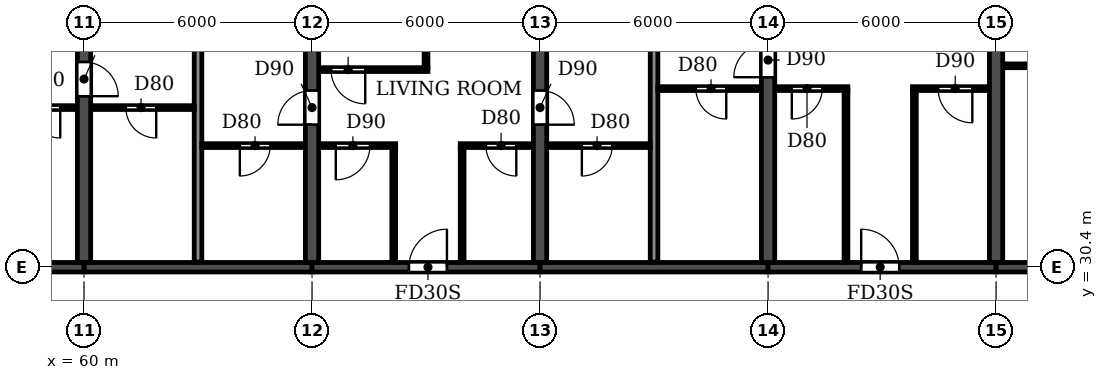
"""IFC4 building model, lengths in metres.
Left out: names, types, materials, properties, quantities, classifications, styles, units other than length and angle.
Written with IfcOpenShell. Run it as: python <this file> out.ifc"""

import sys

from ifc_helpers import new_model, si_unit, direction, frame, frame_2d, origin, place, context, subcontext, project, spatial, rectangle, extrude, element, fill, save


model = new_model("IFC4")
c1 = context("Model", 3, precision=1e-05, world=origin(), true_north=direction((0.0, 1.0)))
c2 = subcontext(c1, "Body", "Model", "MODEL_VIEW")
j1 = project(units=[si_unit("LENGTHUNIT", "METRE"), si_unit("PLANEANGLEUNIT", "RADIAN")], contexts=[c1])
p1 = place(None, origin())
s1 = spatial("IfcSite", under=j1, at=p1, CompositionType="ELEMENT")
p2 = place(p1, origin())
s2 = spatial("IfcBuilding", under=s1, at=p2, CompositionType="ELEMENT")
p3 = place(p2, frame((0.0, 0.0, 72.9)))
s3 = spatial("IfcBuildingStorey", under=s2, at=p3, CompositionType="ELEMENT", Elevation=72.9)
p4 = place(p3, frame((60.0, 30.525, 0.0), z_axis=(0.0, 0.0, 1.0), x_axis=(0.0, 1.0, 0.0)))
e1 = element("IfcWall", 1, at=p4, inside=s3, PredefinedType="SHEAR", context=c2, shape_type="SweptSolid", body=[
    extrude(rectangle(XDim=12.875, YDim=0.35, at=frame_2d((6.438, 0.0))), origin(), (0.0, 0.0, 1.0), 3.06),
])
p5 = place(p4, frame((4.375, 0.0, 0.0)))
e2 = element("IfcOpeningElement", 2, at=p5, cuts=e1, PredefinedType="OPENING", context=c2, shape_type="SweptSolid", body=[
    extrude(rectangle(XDim=0.9, YDim=2.1, at=frame_2d((0.45, 1.05))), frame((0.0, 0.185, 0.0), z_axis=(0.0, -1.0, 0.0), x_axis=(1.0, 0.0, 0.0)), (0.0, 0.0, 1.0), 0.37),
])
p6 = place(p3, frame((66.0, 30.525, 0.0), z_axis=(0.0, 0.0, 1.0), x_axis=(0.0, 1.0, 0.0)))
e3 = element("IfcWall", 3, at=p6, inside=s3, PredefinedType="SHEAR", context=c2, shape_type="SweptSolid", body=[
    extrude(rectangle(XDim=12.875, YDim=0.35, at=frame_2d((6.438, 0.0))), origin(), (0.0, 0.0, 1.0), 3.06),
])
p7 = place(p6, frame((3.625, 0.0, 0.0)))
e4 = element("IfcOpeningElement", 4, at=p7, cuts=e3, PredefinedType="OPENING", context=c2, shape_type="SweptSolid", body=[
    extrude(rectangle(XDim=0.9, YDim=2.1, at=frame_2d((0.45, 1.05))), frame((0.0, 0.185, 0.0), z_axis=(0.0, -1.0, 0.0), x_axis=(1.0, 0.0, 0.0)), (0.0, 0.0, 1.0), 0.37),
])
p8 = place(p3, frame((72.0, 30.525, 0.0), z_axis=(0.0, 0.0, 1.0), x_axis=(0.0, 1.0, 0.0)))
e5 = element("IfcWall", 5, at=p8, inside=s3, PredefinedType="SHEAR", context=c2, shape_type="SweptSolid", body=[
    extrude(rectangle(XDim=12.875, YDim=0.35, at=frame_2d((6.438, 0.0))), origin(), (0.0, 0.0, 1.0), 3.06),
])
p9 = place(p8, frame((3.625, 0.0, 0.0)))
e6 = element("IfcOpeningElement", 6, at=p9, cuts=e5, PredefinedType="OPENING", context=c2, shape_type="SweptSolid", body=[
    extrude(rectangle(XDim=0.9, YDim=2.1, at=frame_2d((0.45, 1.05))), frame((0.0, 0.185, 0.0), z_axis=(0.0, -1.0, 0.0), x_axis=(1.0, 0.0, 0.0)), (0.0, 0.0, 1.0), 0.37),
])
p10 = place(p3, frame((78.0, 30.525, 0.0), z_axis=(0.0, 0.0, 1.0), x_axis=(0.0, 1.0, 0.0)))
e7 = element("IfcWall", 7, at=p10, inside=s3, PredefinedType="SHEAR", context=c2, shape_type="SweptSolid", body=[
    extrude(rectangle(XDim=12.875, YDim=0.35, at=frame_2d((6.438, 0.0))), origin(), (0.0, 0.0, 1.0), 3.06),
])
p11 = place(p10, frame((4.875, 0.0, 0.0)))
e8 = element("IfcOpeningElement", 8, at=p11, cuts=e7, PredefinedType="OPENING", context=c2, shape_type="SweptSolid", body=[
    extrude(rectangle(XDim=0.9, YDim=2.1, at=frame_2d((0.45, 1.05))), frame((0.0, 0.185, 0.0), z_axis=(0.0, -1.0, 0.0), x_axis=(1.0, 0.0, 0.0)), (0.0, 0.0, 1.0), 0.37),
])
p12 = place(p3, frame((84.0, 30.525, 0.0), z_axis=(0.0, 0.0, 1.0), x_axis=(0.0, 1.0, 0.0)))
e9 = element("IfcWall", 9, at=p12, inside=s3, PredefinedType="SHEAR", context=c2, shape_type="SweptSolid", body=[
    extrude(rectangle(XDim=12.875, YDim=0.35, at=frame_2d((6.438, 0.0))), origin(), (0.0, 0.0, 1.0), 3.06),
])
p13 = place(p3, frame((54.0, 30.4, 0.0), z_axis=(0.0, 0.0, 1.0), x_axis=(1.0, 0.0, 0.0)))
e10 = element("IfcWall", 10, at=p13, inside=s3, PredefinedType="SHEAR", context=c2, shape_type="SweptSolid", body=[
    extrude(rectangle(XDim=6.0, YDim=0.25, at=frame_2d((3.0, 0.0))), origin(), (0.0, 0.0, 1.0), 2.46),
])
p14 = place(p13, frame((2.55, 0.0, 0.0)))
e11 = element("IfcOpeningElement", 11, at=p14, cuts=e10, PredefinedType="OPENING", context=c2, shape_type="SweptSolid", body=[
    extrude(rectangle(XDim=1.0, YDim=2.1, at=frame_2d((0.5, 1.05))), frame((0.0, 0.135, 0.0), z_axis=(0.0, -1.0, 0.0), x_axis=(1.0, 0.0, 0.0)), (0.0, 0.0, 1.0), 0.27),
])
p15 = place(p3, frame((60.0, 30.4, 0.0), z_axis=(0.0, 0.0, 1.0), x_axis=(1.0, 0.0, 0.0)))
e12 = element("IfcWall", 12, at=p15, inside=s3, PredefinedType="SHEAR", context=c2, shape_type="SweptSolid", body=[
    extrude(rectangle(XDim=6.0, YDim=0.25, at=frame_2d((3.0, 0.0))), origin(), (0.0, 0.0, 1.0), 2.46),
])
p16 = place(p3, frame((66.0, 30.4, 0.0), z_axis=(0.0, 0.0, 1.0), x_axis=(1.0, 0.0, 0.0)))
e13 = element("IfcWall", 13, at=p16, inside=s3, PredefinedType="SHEAR", context=c2, shape_type="SweptSolid", body=[
    extrude(rectangle(XDim=6.0, YDim=0.25, at=frame_2d((3.0, 0.0))), origin(), (0.0, 0.0, 1.0), 2.46),
])
p17 = place(p16, frame((2.55, 0.0, 0.0)))
e14 = element("IfcOpeningElement", 14, at=p17, cuts=e13, PredefinedType="OPENING", context=c2, shape_type="SweptSolid", body=[
    extrude(rectangle(XDim=1.0, YDim=2.1, at=frame_2d((0.5, 1.05))), frame((0.0, 0.135, 0.0), z_axis=(0.0, -1.0, 0.0), x_axis=(1.0, 0.0, 0.0)), (0.0, 0.0, 1.0), 0.27),
])
p18 = place(p3, frame((72.0, 30.4, 0.0), z_axis=(0.0, 0.0, 1.0), x_axis=(1.0, 0.0, 0.0)))
e15 = element("IfcWall", 15, at=p18, inside=s3, PredefinedType="SHEAR", context=c2, shape_type="SweptSolid", body=[
    extrude(rectangle(XDim=6.0, YDim=0.25, at=frame_2d((3.0, 0.0))), origin(), (0.0, 0.0, 1.0), 2.46),
])
p19 = place(p3, frame((78.0, 30.4, 0.0), z_axis=(0.0, 0.0, 1.0), x_axis=(1.0, 0.0, 0.0)))
e16 = element("IfcWall", 16, at=p19, inside=s3, PredefinedType="SHEAR", context=c2, shape_type="SweptSolid", body=[
    extrude(rectangle(XDim=6.0, YDim=0.25, at=frame_2d((3.0, 0.0))), origin(), (0.0, 0.0, 1.0), 2.46),
])
p20 = place(p19, frame((2.45, 0.0, 0.0)))
e17 = element("IfcOpeningElement", 17, at=p20, cuts=e16, PredefinedType="OPENING", context=c2, shape_type="SweptSolid", body=[
    extrude(rectangle(XDim=1.0, YDim=2.1, at=frame_2d((0.5, 1.05))), frame((0.0, 0.135, 0.0), z_axis=(0.0, -1.0, 0.0), x_axis=(1.0, 0.0, 0.0)), (0.0, 0.0, 1.0), 0.27),
])
p21 = place(p3, frame((84.0, 30.4, 0.0), z_axis=(0.0, 0.0, 1.0), x_axis=(1.0, 0.0, 0.0)))
e18 = element("IfcWall", 18, at=p21, inside=s3, PredefinedType="SHEAR", context=c2, shape_type="SweptSolid", body=[
    extrude(rectangle(XDim=6.0, YDim=0.25, at=frame_2d((3.0, 0.0))), origin(), (0.0, 0.0, 1.0), 2.46),
])
p22 = place(p21, frame((2.55, 0.0, 0.0)))
e19 = element("IfcOpeningElement", 19, at=p22, cuts=e18, PredefinedType="OPENING", context=c2, shape_type="SweptSolid", body=[
    extrude(rectangle(XDim=1.0, YDim=2.1, at=frame_2d((0.5, 1.05))), frame((0.0, 0.135, 0.0), z_axis=(0.0, -1.0, 0.0), x_axis=(1.0, 0.0, 0.0)), (0.0, 0.0, 1.0), 0.27),
])
for number, where, z_axis, x_axis in (
    (20, (63.0, 30.535, 0.0), (0.0, 0.0, 1.0), (0.0, 1.0, 0.0)),
    (21, (75.0, 30.535, 0.0), (0.0, 0.0, 1.0), (0.0, 1.0, 0.0)),
):
    element("IfcWall", number, at=place(p3, frame(where, z_axis=z_axis, x_axis=x_axis)), inside=s3, PredefinedType="PARTITIONING", context=c2, shape_type="SweptSolid", body=[
        extrude(rectangle(XDim=13.005, YDim=0.2, at=frame_2d((6.502, 0.0))), origin(), (0.0, 0.0, 1.0), 3.06),
    ])
p23 = place(p3, frame((63.1, 33.6, 0.0), z_axis=(0.0, 0.0, 1.0), x_axis=(1.0, 0.0, 0.0)))
e22 = element("IfcWall", 22, at=p23, inside=s3, PredefinedType="PARTITIONING", context=c2, shape_type="SweptSolid", body=[
    extrude(rectangle(XDim=2.715, YDim=0.1, at=frame_2d((1.357, 0.0))), origin(), (0.0, 0.0, 1.0), 3.06),
])
p24 = place(p23, frame((1.0, 0.0, 0.0)))
e23 = element("IfcOpeningElement", 23, at=p24, cuts=e22, PredefinedType="OPENING", context=c2, shape_type="SweptSolid", body=[
    extrude(rectangle(XDim=0.8, YDim=2.1, at=frame_2d((0.4, 1.05))), frame((0.0, 0.06, 0.0), z_axis=(0.0, -1.0, 0.0), x_axis=(1.0, 0.0, 0.0)), (0.0, 0.0, 1.0), 0.12),
])
p25 = place(p3, frame((66.185, 33.6, 0.0), z_axis=(0.0, 0.0, 1.0), x_axis=(1.0, 0.0, 0.0)))
e24 = element("IfcWall", 24, at=p25, inside=s3, PredefinedType="PARTITIONING", context=c2, shape_type="SweptSolid", body=[
    extrude(rectangle(XDim=2.015, YDim=0.1, at=frame_2d((1.007, 0.0))), origin(), (0.0, 0.0, 1.0), 3.06),
])
p26 = place(p25, frame((0.44, 0.0, 0.0)))
e25 = element("IfcOpeningElement", 25, at=p26, cuts=e24, PredefinedType="OPENING", context=c2, shape_type="SweptSolid", body=[
    extrude(rectangle(XDim=0.9, YDim=2.1, at=frame_2d((0.45, 1.05))), frame((0.0, 0.06, 0.0), z_axis=(0.0, -1.0, 0.0), x_axis=(1.0, 0.0, 0.0)), (0.0, 0.0, 1.0), 0.12),
])
p27 = place(p3, frame((69.9, 33.6, 0.0), z_axis=(0.0, 0.0, 1.0), x_axis=(1.0, 0.0, 0.0)))
e26 = element("IfcWall", 26, at=p27, inside=s3, PredefinedType="PARTITIONING", context=c2, shape_type="SweptSolid", body=[
    extrude(rectangle(XDim=1.915, YDim=0.1, at=frame_2d((0.958, 0.0))), origin(), (0.0, 0.0, 1.0), 3.06),
])
p28 = place(p27, frame((0.675, 0.0, 0.0)))
e27 = element("IfcOpeningElement", 27, at=p28, cuts=e26, PredefinedType="OPENING", context=c2, shape_type="SweptSolid", body=[
    extrude(rectangle(XDim=0.8, YDim=2.1, at=frame_2d((0.4, 1.05))), frame((0.0, 0.06, 0.0), z_axis=(0.0, -1.0, 0.0), x_axis=(1.0, 0.0, 0.0)), (0.0, 0.0, 1.0), 0.12),
])
p29 = place(p3, frame((72.185, 33.6, 0.0), z_axis=(0.0, 0.0, 1.0), x_axis=(1.0, 0.0, 0.0)))
e28 = element("IfcWall", 28, at=p29, inside=s3, PredefinedType="PARTITIONING", context=c2, shape_type="SweptSolid", body=[
    extrude(rectangle(XDim=2.715, YDim=0.1, at=frame_2d((1.357, 0.0))), origin(), (0.0, 0.0, 1.0), 3.06),
])
p30 = place(p29, frame((0.915, 0.0, 0.0)))
e29 = element("IfcOpeningElement", 29, at=p30, cuts=e28, PredefinedType="OPENING", context=c2, shape_type="SweptSolid", body=[
    extrude(rectangle(XDim=0.8, YDim=2.1, at=frame_2d((0.4, 1.05))), frame((0.0, 0.06, 0.0), z_axis=(0.0, -1.0, 0.0), x_axis=(1.0, 0.0, 0.0)), (0.0, 0.0, 1.0), 0.12),
])
p31 = place(p3, frame((57.9, 34.6, 0.0), z_axis=(0.0, 0.0, 1.0), x_axis=(1.0, 0.0, 0.0)))
e30 = element("IfcWall", 30, at=p31, inside=s3, PredefinedType="PARTITIONING", context=c2, shape_type="SweptSolid", body=[
    extrude(rectangle(XDim=1.915, YDim=0.1, at=frame_2d((0.958, 0.0))), origin(), (0.0, 0.0, 1.0), 3.06),
])
p32 = place(p31, frame((0.675, 0.0, 0.0)))
e31 = element("IfcOpeningElement", 31, at=p32, cuts=e30, PredefinedType="OPENING", context=c2, shape_type="SweptSolid", body=[
    extrude(rectangle(XDim=0.8, YDim=2.1, at=frame_2d((0.4, 1.05))), frame((0.0, 0.06, 0.0), z_axis=(0.0, -1.0, 0.0), x_axis=(1.0, 0.0, 0.0)), (0.0, 0.0, 1.0), 0.12),
])
p33 = place(p3, frame((60.185, 34.6, 0.0), z_axis=(0.0, 0.0, 1.0), x_axis=(1.0, 0.0, 0.0)))
e32 = element("IfcWall", 32, at=p33, inside=s3, PredefinedType="PARTITIONING", context=c2, shape_type="SweptSolid", body=[
    extrude(rectangle(XDim=2.715, YDim=0.1, at=frame_2d((1.357, 0.0))), origin(), (0.0, 0.0, 1.0), 3.06),
])
p34 = place(p33, frame((0.915, 0.0, 0.0)))
e33 = element("IfcOpeningElement", 33, at=p34, cuts=e32, PredefinedType="OPENING", context=c2, shape_type="SweptSolid", body=[
    extrude(rectangle(XDim=0.8, YDim=2.1, at=frame_2d((0.4, 1.05))), frame((0.0, 0.06, 0.0), z_axis=(0.0, -1.0, 0.0), x_axis=(1.0, 0.0, 0.0)), (0.0, 0.0, 1.0), 0.12),
])
p35 = place(p3, frame((75.1, 35.1, 0.0), z_axis=(0.0, 0.0, 1.0), x_axis=(1.0, 0.0, 0.0)))
e34 = element("IfcWall", 34, at=p35, inside=s3, PredefinedType="PARTITIONING", context=c2, shape_type="SweptSolid", body=[
    extrude(rectangle(XDim=2.715, YDim=0.1, at=frame_2d((1.357, 0.0))), origin(), (0.0, 0.0, 1.0), 3.06),
])
p36 = place(p35, frame((1.0, 0.0, 0.0)))
e35 = element("IfcOpeningElement", 35, at=p36, cuts=e34, PredefinedType="OPENING", context=c2, shape_type="SweptSolid", body=[
    extrude(rectangle(XDim=0.8, YDim=2.1, at=frame_2d((0.4, 1.05))), frame((0.0, 0.06, 0.0), z_axis=(0.0, -1.0, 0.0), x_axis=(1.0, 0.0, 0.0)), (0.0, 0.0, 1.0), 0.12),
])
p37 = place(p3, frame((78.185, 35.1, 0.0), z_axis=(0.0, 0.0, 1.0), x_axis=(1.0, 0.0, 0.0)))
e36 = element("IfcWall", 36, at=p37, inside=s3, PredefinedType="PARTITIONING", context=c2, shape_type="SweptSolid", body=[
    extrude(rectangle(XDim=1.915, YDim=0.1, at=frame_2d((0.958, 0.0))), origin(), (0.0, 0.0, 1.0), 3.06),
])
p38 = place(p37, frame((0.44, 0.0, 0.0)))
e37 = element("IfcOpeningElement", 37, at=p38, cuts=e36, PredefinedType="OPENING", context=c2, shape_type="SweptSolid", body=[
    extrude(rectangle(XDim=0.8, YDim=2.1, at=frame_2d((0.4, 1.05))), frame((0.0, 0.06, 0.0), z_axis=(0.0, -1.0, 0.0), x_axis=(1.0, 0.0, 0.0)), (0.0, 0.0, 1.0), 0.12),
])
p39 = place(p3, frame((81.8, 35.1, 0.0), z_axis=(0.0, 0.0, 1.0), x_axis=(1.0, 0.0, 0.0)))
e38 = element("IfcWall", 38, at=p39, inside=s3, PredefinedType="PARTITIONING", context=c2, shape_type="SweptSolid", body=[
    extrude(rectangle(XDim=2.015, YDim=0.1, at=frame_2d((1.007, 0.0))), origin(), (0.0, 0.0, 1.0), 3.06),
])
p40 = place(p39, frame((0.675, 0.0, 0.0)))
e39 = element("IfcOpeningElement", 39, at=p40, cuts=e38, PredefinedType="OPENING", context=c2, shape_type="SweptSolid", body=[
    extrude(rectangle(XDim=0.9, YDim=2.1, at=frame_2d((0.45, 1.05))), frame((0.0, 0.06, 0.0), z_axis=(0.0, -1.0, 0.0), x_axis=(1.0, 0.0, 0.0)), (0.0, 0.0, 1.0), 0.12),
])
p41 = place(p3, frame((66.185, 35.6, 0.0), z_axis=(0.0, 0.0, 1.0), x_axis=(1.0, 0.0, 0.0)))
e40 = element("IfcWall", 40, at=p41, inside=s3, PredefinedType="PARTITIONING", context=c2, shape_type="SweptSolid", body=[
    extrude(rectangle(XDim=2.865, YDim=0.1, at=frame_2d((1.433, 0.0))), origin(), (0.0, 0.0, 1.0), 3.06),
])
p42 = place(p41, frame((0.315, 0.0, 0.0)))
e41 = element("IfcOpeningElement", 41, at=p42, cuts=e40, PredefinedType="OPENING", context=c2, shape_type="SweptSolid", body=[
    extrude(rectangle(XDim=0.9, YDim=2.1, at=frame_2d((0.45, 1.05))), frame((0.0, 0.06, 0.0), z_axis=(0.0, -1.0, 0.0), x_axis=(1.0, 0.0, 0.0)), (0.0, 0.0, 1.0), 0.12),
])
p43 = place(p3, frame((84.185, 35.7, 0.0), z_axis=(0.0, 0.0, 1.0), x_axis=(1.0, 0.0, 0.0)))
e42 = element("IfcWall", 42, at=p43, inside=s3, PredefinedType="PARTITIONING", context=c2, shape_type="SweptSolid", body=[
    extrude(rectangle(XDim=2.015, YDim=0.1, at=frame_2d((1.007, 0.0))), origin(), (0.0, 0.0, 1.0), 3.06),
])
p44 = place(p3, frame((68.15, 30.535, 0.0), z_axis=(0.0, 0.0, 1.0), x_axis=(0.0, 1.0, 0.0)))
e43 = element("IfcWall", 43, at=p44, inside=s3, PredefinedType="PARTITIONING", context=c2, shape_type="SweptSolid", body=[
    extrude(rectangle(XDim=3.015, YDim=0.1, at=frame_2d((1.508, 0.0))), origin(), (0.0, 0.0, 1.0), 3.06),
])
p45 = place(p3, frame((69.0, 35.65, 0.0), z_axis=(0.0, 0.0, 1.0), x_axis=(0.0, 1.0, 0.0)))
e44 = element("IfcWall", 44, at=p45, inside=s3, PredefinedType="PARTITIONING", context=c2, shape_type="SweptSolid", body=[
    extrude(rectangle(XDim=7.89, YDim=0.1, at=frame_2d((3.945, 0.0))), origin(), (0.0, 0.0, 1.0), 3.06),
])
p46 = place(p3, frame((69.95, 30.535, 0.0), z_axis=(0.0, 0.0, 1.0), x_axis=(0.0, 1.0, 0.0)))
e45 = element("IfcWall", 45, at=p46, inside=s3, PredefinedType="PARTITIONING", context=c2, shape_type="SweptSolid", body=[
    extrude(rectangle(XDim=3.015, YDim=0.1, at=frame_2d((1.508, 0.0))), origin(), (0.0, 0.0, 1.0), 3.06),
])
for number, where, z_axis, x_axis in (
    (46, (80.05, 30.535, 0.0), (0.0, 0.0, 1.0), (0.0, 1.0, 0.0)),
    (47, (81.85, 30.535, 0.0), (0.0, 0.0, 1.0), (0.0, 1.0, 0.0)),
):
    element("IfcWall", number, at=place(p3, frame(where, z_axis=z_axis, x_axis=x_axis)), inside=s3, PredefinedType="PARTITIONING", context=c2, shape_type="SweptSolid", body=[
        extrude(rectangle(XDim=4.515, YDim=0.1, at=frame_2d((2.258, 0.0))), origin(), (0.0, 0.0, 1.0), 3.06),
    ])
p47 = place(p34, frame((0.8, 0.0, 0.0), z_axis=(0.0, 0.0, 1.0), x_axis=(-1.0, 0.0, 0.0)))
e48 = element("IfcDoor", 48, at=p47, inside=s3, OperationType="SINGLE_SWING_LEFT", PredefinedType="DOOR", context=c2, shape_type="SweptSolid", body=[
    extrude(rectangle(XDim=0.8, YDim=2.1, at=frame_2d((0.4, 1.05))), frame((0.0, 0.025, 0.0), z_axis=(0.0, -1.0, 0.0), x_axis=(1.0, 0.0, 0.0)), (0.0, 0.0, 1.0), 0.05),
])
fill(e33, e48)
p48 = place(p32, frame((0.8, 0.0, 0.0), z_axis=(0.0, 0.0, 1.0), x_axis=(-1.0, 0.0, 0.0)))
e49 = element("IfcDoor", 49, at=p48, inside=s3, OperationType="SINGLE_SWING_LEFT", PredefinedType="DOOR", context=c2, shape_type="SweptSolid", body=[
    extrude(rectangle(XDim=0.8, YDim=2.1, at=frame_2d((0.4, 1.05))), frame((0.0, 0.025, 0.0), z_axis=(0.0, -1.0, 0.0), x_axis=(1.0, 0.0, 0.0)), (0.0, 0.0, 1.0), 0.05),
])
fill(e31, e49)
p49 = place(p5, frame((0.9, 0.0, 0.0), z_axis=(0.0, 0.0, 1.0), x_axis=(-1.0, 0.0, 0.0)))
e50 = element("IfcDoor", 50, at=p49, inside=s3, OperationType="SINGLE_SWING_RIGHT", PredefinedType="DOOR", context=c2, shape_type="SweptSolid", body=[
    extrude(rectangle(XDim=0.9, YDim=2.1, at=frame_2d((0.45, 1.05))), frame((0.0, 0.025, 0.0), z_axis=(0.0, -1.0, 0.0), x_axis=(1.0, 0.0, 0.0)), (0.0, 0.0, 1.0), 0.05),
])
fill(e2, e50)
p50 = place(p24, frame((0.8, 0.0, 0.0), z_axis=(0.0, 0.0, 1.0), x_axis=(-1.0, 0.0, 0.0)))
e51 = element("IfcDoor", 51, at=p50, inside=s3, OperationType="SINGLE_SWING_RIGHT", PredefinedType="DOOR", context=c2, shape_type="SweptSolid", body=[
    extrude(rectangle(XDim=0.8, YDim=2.1, at=frame_2d((0.4, 1.05))), frame((0.0, 0.025, 0.0), z_axis=(0.0, -1.0, 0.0), x_axis=(1.0, 0.0, 0.0)), (0.0, 0.0, 1.0), 0.05),
])
fill(e23, e51)
p51 = place(p30, frame((0.8, 0.0, 0.0), z_axis=(0.0, 0.0, 1.0), x_axis=(-1.0, 0.0, 0.0)))
e52 = element("IfcDoor", 52, at=p51, inside=s3, OperationType="SINGLE_SWING_RIGHT", PredefinedType="DOOR", context=c2, shape_type="SweptSolid", body=[
    extrude(rectangle(XDim=0.8, YDim=2.1, at=frame_2d((0.4, 1.05))), frame((0.0, 0.025, 0.0), z_axis=(0.0, -1.0, 0.0), x_axis=(1.0, 0.0, 0.0)), (0.0, 0.0, 1.0), 0.05),
])
fill(e29, e52)
p52 = place(p7, origin())
e53 = element("IfcDoor", 53, at=p52, inside=s3, OperationType="SINGLE_SWING_LEFT", PredefinedType="DOOR", context=c2, shape_type="SweptSolid", body=[
    extrude(rectangle(XDim=0.9, YDim=2.1, at=frame_2d((0.45, 1.05))), frame((0.0, 0.025, 0.0), z_axis=(0.0, -1.0, 0.0), x_axis=(1.0, 0.0, 0.0)), (0.0, 0.0, 1.0), 0.05),
])
fill(e4, e53)
p53 = place(p42, frame((0.9, 0.0, 0.0), z_axis=(0.0, 0.0, 1.0), x_axis=(-1.0, 0.0, 0.0)))
e54 = element("IfcDoor", 54, at=p53, inside=s3, OperationType="SINGLE_SWING_LEFT", PredefinedType="DOOR", context=c2, shape_type="SweptSolid", body=[
    extrude(rectangle(XDim=0.9, YDim=2.1, at=frame_2d((0.45, 1.05))), frame((0.0, 0.025, 0.0), z_axis=(0.0, -1.0, 0.0), x_axis=(1.0, 0.0, 0.0)), (0.0, 0.0, 1.0), 0.05),
])
fill(e41, e54)
p54 = place(p26, frame((0.9, 0.0, 0.0), z_axis=(0.0, 0.0, 1.0), x_axis=(-1.0, 0.0, 0.0)))
e55 = element("IfcDoor", 55, at=p54, inside=s3, OperationType="SINGLE_SWING_RIGHT", PredefinedType="DOOR", context=c2, shape_type="SweptSolid", body=[
    extrude(rectangle(XDim=0.9, YDim=2.1, at=frame_2d((0.45, 1.05))), frame((0.0, 0.025, 0.0), z_axis=(0.0, -1.0, 0.0), x_axis=(1.0, 0.0, 0.0)), (0.0, 0.0, 1.0), 0.05),
])
fill(e25, e55)
p55 = place(p17, origin())
e56 = element("IfcDoor", 56, at=p55, inside=s3, OperationType="SINGLE_SWING_RIGHT", PredefinedType="DOOR", context=c2, shape_type="SweptSolid", body=[
    extrude(rectangle(XDim=1.0, YDim=2.1, at=frame_2d((0.5, 1.05))), frame((0.0, 0.025, 0.0), z_axis=(0.0, -1.0, 0.0), x_axis=(1.0, 0.0, 0.0)), (0.0, 0.0, 1.0), 0.05),
])
fill(e14, e56)
p56 = place(p28, frame((0.8, 0.0, 0.0), z_axis=(0.0, 0.0, 1.0), x_axis=(-1.0, 0.0, 0.0)))
e57 = element("IfcDoor", 57, at=p56, inside=s3, OperationType="SINGLE_SWING_LEFT", PredefinedType="DOOR", context=c2, shape_type="SweptSolid", body=[
    extrude(rectangle(XDim=0.8, YDim=2.1, at=frame_2d((0.4, 1.05))), frame((0.0, 0.025, 0.0), z_axis=(0.0, -1.0, 0.0), x_axis=(1.0, 0.0, 0.0)), (0.0, 0.0, 1.0), 0.05),
])
fill(e27, e57)
p57 = place(p9, frame((0.9, 0.0, 0.0), z_axis=(0.0, 0.0, 1.0), x_axis=(-1.0, 0.0, 0.0)))
e58 = element("IfcDoor", 58, at=p57, inside=s3, OperationType="SINGLE_SWING_RIGHT", PredefinedType="DOOR", context=c2, shape_type="SweptSolid", body=[
    extrude(rectangle(XDim=0.9, YDim=2.1, at=frame_2d((0.45, 1.05))), frame((0.0, 0.025, 0.0), z_axis=(0.0, -1.0, 0.0), x_axis=(1.0, 0.0, 0.0)), (0.0, 0.0, 1.0), 0.05),
])
fill(e6, e58)
p58 = place(p36, frame((0.8, 0.0, 0.0), z_axis=(0.0, 0.0, 1.0), x_axis=(-1.0, 0.0, 0.0)))
e59 = element("IfcDoor", 59, at=p58, inside=s3, OperationType="SINGLE_SWING_LEFT", PredefinedType="DOOR", context=c2, shape_type="SweptSolid", body=[
    extrude(rectangle(XDim=0.8, YDim=2.1, at=frame_2d((0.4, 1.05))), frame((0.0, 0.025, 0.0), z_axis=(0.0, -1.0, 0.0), x_axis=(1.0, 0.0, 0.0)), (0.0, 0.0, 1.0), 0.05),
])
fill(e35, e59)
p59 = place(p11, origin())
e60 = element("IfcDoor", 60, at=p59, inside=s3, OperationType="SINGLE_SWING_LEFT", PredefinedType="DOOR", context=c2, shape_type="SweptSolid", body=[
    extrude(rectangle(XDim=0.9, YDim=2.1, at=frame_2d((0.45, 1.05))), frame((0.0, 0.025, 0.0), z_axis=(0.0, -1.0, 0.0), x_axis=(1.0, 0.0, 0.0)), (0.0, 0.0, 1.0), 0.05),
])
fill(e8, e60)
p60 = place(p38, frame((0.8, 0.0, 0.0), z_axis=(0.0, 0.0, 1.0), x_axis=(-1.0, 0.0, 0.0)))
e61 = element("IfcDoor", 61, at=p60, inside=s3, OperationType="SINGLE_SWING_RIGHT", PredefinedType="DOOR", context=c2, shape_type="SweptSolid", body=[
    extrude(rectangle(XDim=0.8, YDim=2.1, at=frame_2d((0.4, 1.05))), frame((0.0, 0.025, 0.0), z_axis=(0.0, -1.0, 0.0), x_axis=(1.0, 0.0, 0.0)), (0.0, 0.0, 1.0), 0.05),
])
fill(e37, e61)
p61 = place(p20, origin())
e62 = element("IfcDoor", 62, at=p61, inside=s3, OperationType="SINGLE_SWING_LEFT", PredefinedType="DOOR", context=c2, shape_type="SweptSolid", body=[
    extrude(rectangle(XDim=1.0, YDim=2.1, at=frame_2d((0.5, 1.05))), frame((0.0, 0.025, 0.0), z_axis=(0.0, -1.0, 0.0), x_axis=(1.0, 0.0, 0.0)), (0.0, 0.0, 1.0), 0.05),
])
fill(e17, e62)
p62 = place(p40, frame((0.9, 0.0, 0.0), z_axis=(0.0, 0.0, 1.0), x_axis=(-1.0, 0.0, 0.0)))
e63 = element("IfcDoor", 63, at=p62, inside=s3, OperationType="SINGLE_SWING_LEFT", PredefinedType="DOOR", context=c2, shape_type="SweptSolid", body=[
    extrude(rectangle(XDim=0.9, YDim=2.1, at=frame_2d((0.45, 1.05))), frame((0.0, 0.025, 0.0), z_axis=(0.0, -1.0, 0.0), x_axis=(1.0, 0.0, 0.0)), (0.0, 0.0, 1.0), 0.05),
])
fill(e39, e63)
save(model, sys.argv[1])
